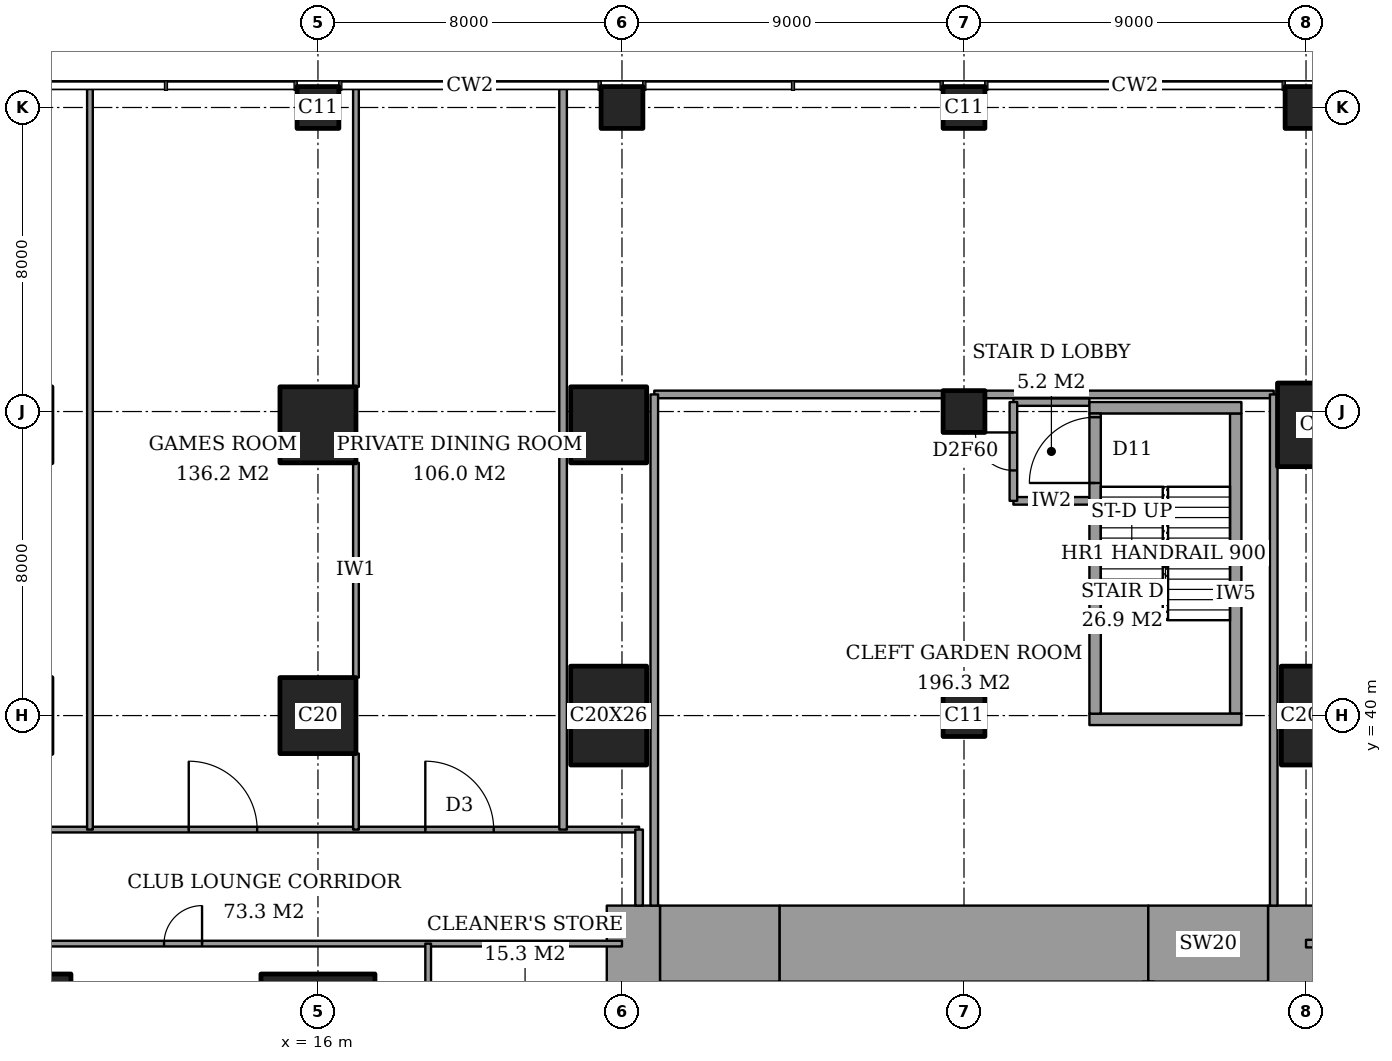
"""IFC4 building model, lengths in metres.
Left out: names, types, materials, properties, quantities, classifications, styles, units other than length and angle.
Written with IfcOpenShell. Run it as: python <this file> out.ifc"""

import sys

from ifc_helpers import new_model, si_unit, direction, frame, frame_2d, origin, origin_2d, place, context, subcontext, project, spatial, rectangle, extrude, element, fill, save


model = new_model("IFC4")
c1 = context("Model", 3, precision=1e-05, world=origin(), true_north=direction((0.0, 1.0)))
c2 = subcontext(c1, "Body", "Model", "MODEL_VIEW")
j1 = project(units=[si_unit("LENGTHUNIT", "METRE"), si_unit("PLANEANGLEUNIT", "RADIAN")], contexts=[c1])
p1 = place(None, origin())
s1 = spatial("IfcSite", under=j1, at=p1, CompositionType="ELEMENT")
p2 = place(p1, origin())
s2 = spatial("IfcBuilding", under=s1, at=p2, CompositionType="ELEMENT")
p3 = place(p2, frame((0.0, 0.0, 6.0)))
s3 = spatial("IfcBuildingStorey", under=s2, at=p3, CompositionType="ELEMENT", Elevation=6.0)
for number, where, z_axis, x_axis in (
    (1, (8.0, 32.0, 0.0), (0.0, 0.0, 1.0), (1.0, 0.0, 0.0)),
    (2, (16.0, 32.0, 0.0), (0.0, 0.0, 1.0), (1.0, 0.0, 0.0)),
):
    element("IfcColumn", number, at=place(p3, frame(where, z_axis=z_axis, x_axis=x_axis)), inside=s3, PredefinedType="COLUMN", context=c2, shape_type="SweptSolid", body=[
        extrude(rectangle(XDim=3.0, YDim=2.4, at=origin_2d()), origin(), (0.0, 0.0, 1.0), 5.0),
    ])
for number, where, z_axis, x_axis in (
    (3, (16.0, 40.0, 0.0), (0.0, 0.0, 1.0), (1.0, 0.0, 0.0)),
    (4, (16.0, 47.65, 0.0), (0.0, 0.0, 1.0), (1.0, 0.0, 0.0)),
):
    element("IfcColumn", number, at=place(p3, frame(where, z_axis=z_axis, x_axis=x_axis)), inside=s3, PredefinedType="COLUMN", context=c2, shape_type="SweptSolid", body=[
        extrude(rectangle(XDim=2.0, YDim=2.0, at=origin_2d()), origin(), (0.0, 0.0, 1.0), 5.0),
    ])
p4 = place(p3, frame((16.0, 56.0, 0.0), z_axis=(0.0, 0.0, 1.0), x_axis=(1.0, 0.0, 0.0)))
e5 = element("IfcColumn", 5, at=p4, inside=s3, PredefinedType="COLUMN", context=c2, shape_type="SweptSolid", body=[
    extrude(rectangle(XDim=1.1, YDim=1.1, at=origin_2d()), origin(), (0.0, 0.0, 1.0), 5.0),
])
p5 = place(p3, frame((23.65, 40.0, 0.0), z_axis=(0.0, 0.0, 1.0), x_axis=(1.0, 0.0, 0.0)))
e6 = element("IfcColumn", 6, at=p5, inside=s3, PredefinedType="COLUMN", context=c2, shape_type="SweptSolid", body=[
    extrude(rectangle(XDim=2.0, YDim=2.6, at=origin_2d()), origin(), (0.0, 0.0, 1.0), 5.0),
])
p6 = place(p3, frame((23.65, 47.65, 0.0), z_axis=(0.0, 0.0, 1.0), x_axis=(1.0, 0.0, 0.0)))
e7 = element("IfcColumn", 7, at=p6, inside=s3, PredefinedType="COLUMN", context=c2, shape_type="SweptSolid", body=[
    extrude(rectangle(XDim=2.0, YDim=2.0, at=origin_2d()), origin(), (0.0, 0.0, 1.0), 5.0),
])
for number, where, z_axis, x_axis in (
    (8, (24.0, 56.0, 0.0), (0.0, 0.0, 1.0), (1.0, 0.0, 0.0)),
    (9, (33.0, 40.0, 0.0), (0.0, 0.0, 1.0), (1.0, 0.0, 0.0)),
    (10, (33.0, 48.0, 0.0), (0.0, 0.0, 1.0), (1.0, 0.0, 0.0)),
    (11, (33.0, 56.0, 0.0), (0.0, 0.0, 1.0), (1.0, 0.0, 0.0)),
):
    element("IfcColumn", number, at=place(p3, frame(where, z_axis=z_axis, x_axis=x_axis)), inside=s3, PredefinedType="COLUMN", context=c2, shape_type="SweptSolid", body=[
        extrude(rectangle(XDim=1.1, YDim=1.1, at=origin_2d()), origin(), (0.0, 0.0, 1.0), 5.0),
    ])
p7 = place(p3, frame((42.35, 40.0, 0.0), z_axis=(0.0, 0.0, 1.0), x_axis=(1.0, 0.0, 0.0)))
e12 = element("IfcColumn", 12, at=p7, inside=s3, PredefinedType="COLUMN", context=c2, shape_type="SweptSolid", body=[
    extrude(rectangle(XDim=2.0, YDim=2.6, at=origin_2d()), origin(), (0.0, 0.0, 1.0), 5.0),
])
p8 = place(p3, frame((42.35, 47.65, 0.0), z_axis=(0.0, 0.0, 1.0), x_axis=(1.0, 0.0, 0.0)))
e13 = element("IfcColumn", 13, at=p8, inside=s3, PredefinedType="COLUMN", context=c2, shape_type="SweptSolid", body=[
    extrude(rectangle(XDim=2.2, YDim=2.2, at=origin_2d()), origin(), (0.0, 0.0, 1.0), 5.0),
])
p9 = place(p3, frame((42.0, 56.0, 0.0), z_axis=(0.0, 0.0, 1.0), x_axis=(1.0, 0.0, 0.0)))
e14 = element("IfcColumn", 14, at=p9, inside=s3, PredefinedType="COLUMN", context=c2, shape_type="SweptSolid", body=[
    extrude(rectangle(XDim=1.1, YDim=1.1, at=origin_2d()), origin(), (0.0, 0.0, 1.0), 5.0),
])
p10 = place(p3, frame((25.0, 34.0, 0.0), z_axis=(0.0, 0.0, 1.0), x_axis=(1.0, 0.0, 0.0)))
e15 = element("IfcWall", 15, at=p10, inside=s3, PredefinedType="SHEAR", context=c2, shape_type="SweptSolid", body=[
    extrude(rectangle(XDim=3.15, YDim=2.0, at=frame_2d((1.575, 0.0))), origin(), (0.0, 0.0, 1.0), 5.0),
])
p11 = place(p3, frame((28.15, 34.0, 0.0), z_axis=(0.0, 0.0, 1.0), x_axis=(1.0, 0.0, 0.0)))
e16 = element("IfcWall", 16, at=p11, inside=s3, PredefinedType="SHEAR", context=c2, shape_type="SweptSolid", body=[
    extrude(rectangle(XDim=9.7, YDim=2.0, at=frame_2d((4.85, 0.0))), origin(), (0.0, 0.0, 1.0), 5.0),
])
p12 = place(p3, frame((37.85, 34.0, 0.0), z_axis=(0.0, 0.0, 1.0), x_axis=(1.0, 0.0, 0.0)))
e17 = element("IfcWall", 17, at=p12, inside=s3, PredefinedType="SHEAR", context=c2, shape_type="SweptSolid", body=[
    extrude(rectangle(XDim=3.15, YDim=2.0, at=frame_2d((1.575, 0.0))), origin(), (0.0, 0.0, 1.0), 5.0),
])
p13 = place(p3, frame((24.3, 23.15, 0.0), z_axis=(0.0, 0.0, 1.0), x_axis=(0.0, 1.0, 0.0)))
e18 = element("IfcWall", 18, at=p13, inside=s3, PredefinedType="SHEAR", context=c2, shape_type="SweptSolid", body=[
    extrude(rectangle(XDim=11.85, YDim=1.4, at=frame_2d((5.925, 0.0))), origin(), (0.0, 0.0, 1.0), 5.0),
])
p14 = place(p13, frame((0.75, 0.0, 0.0)))
e19 = element("IfcOpeningElement", 19, at=p14, cuts=e18, PredefinedType="OPENING", context=c2, shape_type="SweptSolid", body=[
    extrude(rectangle(XDim=1.8, YDim=2.4, at=frame_2d((0.9, 1.2))), frame((0.0, 0.71, 0.0), z_axis=(0.0, -1.0, 0.0), x_axis=(1.0, 0.0, 0.0)), (0.0, 0.0, 1.0), 1.42),
])
p15 = place(p3, frame((41.7, 24.85, 0.0), z_axis=(0.0, 0.0, 1.0), x_axis=(0.0, 1.0, 0.0)))
e20 = element("IfcWall", 20, at=p15, inside=s3, PredefinedType="SHEAR", context=c2, shape_type="SweptSolid", body=[
    extrude(rectangle(XDim=10.15, YDim=1.4, at=frame_2d((5.075, 0.0))), origin(), (0.0, 0.0, 1.0), 5.0),
])
p16 = place(p3, frame((42.0, 34.0, 0.0), z_axis=(0.0, 0.0, 1.0), x_axis=(1.0, 0.0, 0.0)))
e21 = element("IfcWall", 21, at=p16, inside=s3, PredefinedType="PARTITIONING", context=c2, shape_type="SweptSolid", body=[
    extrude(rectangle(XDim=6.0, YDim=0.2, at=frame_2d((3.0, 0.0))), origin(), (0.0, 0.0, 1.0), 4.7),
])
p17 = place(p3, frame((0.0, 34.0, 0.0), z_axis=(0.0, 0.0, 1.0), x_axis=(1.0, 0.0, 0.0)))
e22 = element("IfcWall", 22, at=p17, inside=s3, PredefinedType="PARTITIONING", context=c2, shape_type="SweptSolid", body=[
    extrude(rectangle(XDim=24.0, YDim=0.15, at=frame_2d((12.0, 0.0))), origin(), (0.0, 0.0, 1.0), 4.7),
])
p18 = place(p17, frame((11.95, 0.0, 0.0)))
e23 = element("IfcOpeningElement", 23, at=p18, cuts=e22, PredefinedType="OPENING", context=c2, shape_type="SweptSolid", body=[
    extrude(rectangle(XDim=1.0, YDim=2.1, at=frame_2d((0.5, 1.05))), frame((0.0, 0.085, 0.0), z_axis=(0.0, -1.0, 0.0), x_axis=(1.0, 0.0, 0.0)), (0.0, 0.0, 1.0), 0.17),
])
p19 = place(p17, frame((2.55, 0.0, 0.0)))
e24 = element("IfcOpeningElement", 24, at=p19, cuts=e22, PredefinedType="OPENING", context=c2, shape_type="SweptSolid", body=[
    extrude(rectangle(XDim=0.9, YDim=2.1, at=frame_2d((0.45, 1.05))), frame((0.0, 0.085, 0.0), z_axis=(0.0, -1.0, 0.0), x_axis=(1.0, 0.0, 0.0)), (0.0, 0.0, 1.0), 0.17),
])
p20 = place(p3, frame((0.0, 37.0, 0.0), z_axis=(0.0, 0.0, 1.0), x_axis=(1.0, 0.0, 0.0)))
e25 = element("IfcWall", 25, at=p20, inside=s3, PredefinedType="PARTITIONING", context=c2, shape_type="SweptSolid", body=[
    extrude(rectangle(XDim=24.45, YDim=0.15, at=frame_2d((12.225, 0.0))), origin(), (0.0, 0.0, 1.0), 4.7),
])
p21 = place(p20, frame((4.1, 0.0, 0.0)))
e26 = element("IfcOpeningElement", 26, at=p21, cuts=e25, PredefinedType="OPENING", context=c2, shape_type="SweptSolid", body=[
    extrude(rectangle(XDim=1.8, YDim=2.1, at=frame_2d((0.9, 1.05))), frame((0.0, 0.085, 0.0), z_axis=(0.0, -1.0, 0.0), x_axis=(1.0, 0.0, 0.0)), (0.0, 0.0, 1.0), 0.17),
])
p22 = place(p20, frame((12.6, 0.0, 0.0)))
e27 = element("IfcOpeningElement", 27, at=p22, cuts=e25, PredefinedType="OPENING", context=c2, shape_type="SweptSolid", body=[
    extrude(rectangle(XDim=1.8, YDim=2.1, at=frame_2d((0.9, 1.05))), frame((0.0, 0.085, 0.0), z_axis=(0.0, -1.0, 0.0), x_axis=(1.0, 0.0, 0.0)), (0.0, 0.0, 1.0), 0.17),
])
p23 = place(p20, frame((18.825, 0.0, 0.0)))
e28 = element("IfcOpeningElement", 28, at=p23, cuts=e25, PredefinedType="OPENING", context=c2, shape_type="SweptSolid", body=[
    extrude(rectangle(XDim=1.8, YDim=2.1, at=frame_2d((0.9, 1.05))), frame((0.0, 0.085, 0.0), z_axis=(0.0, -1.0, 0.0), x_axis=(1.0, 0.0, 0.0)), (0.0, 0.0, 1.0), 0.17),
])
for number, where, z_axis, x_axis in (
    (29, (34.3, 45.65, 0.0), (0.0, 0.0, 1.0), (1.0, 0.0, 0.0)),
    (30, (34.3, 48.25, 0.0), (0.0, 0.0, 1.0), (1.0, 0.0, 0.0)),
):
    element("IfcWall", number, at=place(p3, frame(where, z_axis=z_axis, x_axis=x_axis)), inside=s3, PredefinedType="PARTITIONING", context=c2, shape_type="SweptSolid", body=[
        extrude(rectangle(XDim=2.0, YDim=0.2, at=frame_2d((1.0, 0.0))), origin(), (0.0, 0.0, 1.0), 4.7),
    ])
for number, where, z_axis, x_axis in (
    (31, (24.85, 48.45, 0.0), (0.0, 0.0, 1.0), (1.0, 0.0, 0.0)),
    (32, (33.55, 48.45, 0.0), (0.0, 0.0, 1.0), (1.0, 0.0, 0.0)),
):
    element("IfcWall", number, at=place(p3, frame(where, z_axis=z_axis, x_axis=x_axis)), inside=s3, PredefinedType="PARTITIONING", context=c2, shape_type="SweptSolid", body=[
        extrude(rectangle(XDim=7.6, YDim=0.2, at=frame_2d((3.8, 0.0))), origin(), (0.0, 0.0, 1.0), 4.7),
    ])
p24 = place(p3, frame((10.0, 37.0, 0.0), z_axis=(0.0, 0.0, 1.0), x_axis=(0.0, 1.0, 0.0)))
e33 = element("IfcWall", 33, at=p24, inside=s3, PredefinedType="PARTITIONING", context=c2, shape_type="SweptSolid", body=[
    extrude(rectangle(XDim=19.561, YDim=0.15, at=frame_2d((9.781, 0.0))), origin(), (0.0, 0.0, 1.0), 4.7),
])
p25 = place(p3, frame((17.0, 37.0, 0.0), z_axis=(0.0, 0.0, 1.0), x_axis=(0.0, 1.0, 0.0)))
e34 = element("IfcWall", 34, at=p25, inside=s3, PredefinedType="PARTITIONING", context=c2, shape_type="SweptSolid", body=[
    extrude(rectangle(XDim=2.0, YDim=0.15, at=frame_2d((1.0, 0.0))), origin(), (0.0, 0.0, 1.0), 4.7),
])
p26 = place(p3, frame((17.0, 41.0, 0.0), z_axis=(0.0, 0.0, 1.0), x_axis=(0.0, 1.0, 0.0)))
e35 = element("IfcWall", 35, at=p26, inside=s3, PredefinedType="PARTITIONING", context=c2, shape_type="SweptSolid", body=[
    extrude(rectangle(XDim=5.65, YDim=0.15, at=frame_2d((2.825, 0.0))), origin(), (0.0, 0.0, 1.0), 4.7),
])
p27 = place(p3, frame((17.0, 48.65, 0.0), z_axis=(0.0, 0.0, 1.0), x_axis=(0.0, 1.0, 0.0)))
e36 = element("IfcWall", 36, at=p27, inside=s3, PredefinedType="PARTITIONING", context=c2, shape_type="SweptSolid", body=[
    extrude(rectangle(XDim=7.911, YDim=0.15, at=frame_2d((3.956, 0.0))), origin(), (0.0, 0.0, 1.0), 4.7),
])
p28 = place(p3, frame((18.9, 31.0, 0.0), z_axis=(0.0, 0.0, 1.0), x_axis=(0.0, 1.0, 0.0)))
e37 = element("IfcWall", 37, at=p28, inside=s3, PredefinedType="PARTITIONING", context=c2, shape_type="SweptSolid", body=[
    extrude(rectangle(XDim=3.0, YDim=0.15, at=frame_2d((1.5, 0.0))), origin(), (0.0, 0.0, 1.0), 4.7),
])
p29 = place(p28, frame((1.05, 0.0, 0.0)))
e38 = element("IfcOpeningElement", 38, at=p29, cuts=e37, PredefinedType="OPENING", context=c2, shape_type="SweptSolid", body=[
    extrude(rectangle(XDim=0.9, YDim=2.1, at=frame_2d((0.45, 1.05))), frame((0.0, 0.085, 0.0), z_axis=(0.0, -1.0, 0.0), x_axis=(1.0, 0.0, 0.0)), (0.0, 0.0, 1.0), 0.17),
])
p30 = place(p3, frame((22.45, 37.0, 0.0), z_axis=(0.0, 0.0, 1.0), x_axis=(0.0, 1.0, 0.0)))
e39 = element("IfcWall", 39, at=p30, inside=s3, PredefinedType="PARTITIONING", context=c2, shape_type="SweptSolid", body=[
    extrude(rectangle(XDim=19.561, YDim=0.2, at=frame_2d((9.781, 0.0))), origin(), (0.0, 0.0, 1.0), 4.7),
])
p31 = place(p3, frame((24.45, 35.0, 0.0), z_axis=(0.0, 0.0, 1.0), x_axis=(0.0, 1.0, 0.0)))
e40 = element("IfcWall", 40, at=p31, inside=s3, PredefinedType="PARTITIONING", context=c2, shape_type="SweptSolid", body=[
    extrude(rectangle(XDim=2.0, YDim=0.2, at=frame_2d((1.0, 0.0))), origin(), (0.0, 0.0, 1.0), 4.7),
])
p32 = place(p3, frame((24.85, 35.0, 0.0), z_axis=(0.0, 0.0, 1.0), x_axis=(0.0, 1.0, 0.0)))
e41 = element("IfcWall", 41, at=p32, inside=s3, PredefinedType="PARTITIONING", context=c2, shape_type="SweptSolid", body=[
    extrude(rectangle(XDim=13.45, YDim=0.2, at=frame_2d((6.725, 0.0))), origin(), (0.0, 0.0, 1.0), 4.7),
])
p33 = place(p3, frame((34.3, 45.65, 0.0), z_axis=(0.0, 0.0, 1.0), x_axis=(0.0, 1.0, 0.0)))
e42 = element("IfcWall", 42, at=p33, inside=s3, PredefinedType="PARTITIONING", context=c2, shape_type="SweptSolid", body=[
    extrude(rectangle(XDim=2.6, YDim=0.2, at=frame_2d((1.3, 0.0))), origin(), (0.0, 0.0, 1.0), 4.7),
])
p34 = place(p33, frame((0.8, 0.0, 0.0)))
e43 = element("IfcOpeningElement", 43, at=p34, cuts=e42, PredefinedType="OPENING", context=c2, shape_type="SweptSolid", body=[
    extrude(rectangle(XDim=1.0, YDim=2.1, at=frame_2d((0.5, 1.05))), frame((0.0, 0.11, 0.0), z_axis=(0.0, -1.0, 0.0), x_axis=(1.0, 0.0, 0.0)), (0.0, 0.0, 1.0), 0.22),
])
p35 = place(p3, frame((41.15, 35.0, 0.0), z_axis=(0.0, 0.0, 1.0), x_axis=(0.0, 1.0, 0.0)))
e44 = element("IfcWall", 44, at=p35, inside=s3, PredefinedType="PARTITIONING", context=c2, shape_type="SweptSolid", body=[
    extrude(rectangle(XDim=13.45, YDim=0.2, at=frame_2d((6.725, 0.0))), origin(), (0.0, 0.0, 1.0), 4.7),
])
for number, where, z_axis, x_axis in (
    (45, (36.3, 39.9, 0.0), (0.0, 0.0, 1.0), (1.0, 0.0, 0.0)),
    (46, (36.3, 48.1, 0.0), (0.0, 0.0, 1.0), (1.0, 0.0, 0.0)),
):
    element("IfcWall", number, at=place(p3, frame(where, z_axis=z_axis, x_axis=x_axis)), inside=s3, PredefinedType="PARTITIONING", context=c2, shape_type="SweptSolid", body=[
        extrude(rectangle(XDim=4.0, YDim=0.3, at=frame_2d((2.0, 0.0))), origin(), (0.0, 0.0, 1.0), 5.0),
    ])
p36 = place(p3, frame((36.45, 40.05, 0.0), z_axis=(0.0, 0.0, 1.0), x_axis=(0.0, 1.0, 0.0)))
e47 = element("IfcWall", 47, at=p36, inside=s3, PredefinedType="PARTITIONING", context=c2, shape_type="SweptSolid", body=[
    extrude(rectangle(XDim=7.9, YDim=0.3, at=frame_2d((3.95, 0.0))), origin(), (0.0, 0.0, 1.0), 5.0),
])
p37 = place(p36, frame((6.07, 0.0, 0.0)))
e48 = element("IfcOpeningElement", 48, at=p37, cuts=e47, PredefinedType="OPENING", context=c2, shape_type="SweptSolid", body=[
    extrude(rectangle(XDim=1.73, YDim=2.1, at=frame_2d((0.865, 1.05))), frame((0.0, 0.16, 0.0), z_axis=(0.0, -1.0, 0.0), x_axis=(1.0, 0.0, 0.0)), (0.0, 0.0, 1.0), 0.32),
])
p38 = place(p3, frame((40.15, 40.05, 0.0), z_axis=(0.0, 0.0, 1.0), x_axis=(0.0, 1.0, 0.0)))
e49 = element("IfcWall", 49, at=p38, inside=s3, PredefinedType="PARTITIONING", context=c2, shape_type="SweptSolid", body=[
    extrude(rectangle(XDim=7.9, YDim=0.3, at=frame_2d((3.95, 0.0))), origin(), (0.0, 0.0, 1.0), 5.0),
])
p39 = place(p18, origin())
e50 = element("IfcDoor", 50, at=p39, inside=s3, OperationType="SINGLE_SWING_LEFT", PredefinedType="DOOR", context=c2, shape_type="SweptSolid", body=[
    extrude(rectangle(XDim=1.0, YDim=2.1, at=frame_2d((0.5, 1.05))), frame((0.0, 0.025, 0.0), z_axis=(0.0, -1.0, 0.0), x_axis=(1.0, 0.0, 0.0)), (0.0, 0.0, 1.0), 0.05),
])
fill(e23, e50)
p40 = place(p22, origin())
e51 = element("IfcDoor", 51, at=p40, inside=s3, OperationType="DOUBLE_DOOR_DOUBLE_SWING", PredefinedType="DOOR", context=c2, shape_type="SweptSolid", body=[
    extrude(rectangle(XDim=1.8, YDim=2.1, at=frame_2d((0.9, 1.05))), frame((0.0, 0.025, 0.0), z_axis=(0.0, -1.0, 0.0), x_axis=(1.0, 0.0, 0.0)), (0.0, 0.0, 1.0), 0.05),
])
fill(e27, e51)
p41 = place(p23, origin())
e52 = element("IfcDoor", 52, at=p41, inside=s3, OperationType="DOUBLE_DOOR_DOUBLE_SWING", PredefinedType="DOOR", context=c2, shape_type="SweptSolid", body=[
    extrude(rectangle(XDim=1.8, YDim=2.1, at=frame_2d((0.9, 1.05))), frame((0.0, 0.025, 0.0), z_axis=(0.0, -1.0, 0.0), x_axis=(1.0, 0.0, 0.0)), (0.0, 0.0, 1.0), 0.05),
])
fill(e28, e52)
p42 = place(p34, origin())
e53 = element("IfcDoor", 53, at=p42, inside=s3, OperationType="SINGLE_SWING_LEFT", PredefinedType="DOOR", context=c2, shape_type="SweptSolid", body=[
    extrude(rectangle(XDim=1.0, YDim=2.1, at=frame_2d((0.5, 1.05))), frame((0.0, 0.025, 0.0), z_axis=(0.0, -1.0, 0.0), x_axis=(1.0, 0.0, 0.0)), (0.0, 0.0, 1.0), 0.05),
])
fill(e43, e53)
p43 = place(p37, origin())
e54 = element("IfcDoor", 54, at=p43, inside=s3, OperationType="DOUBLE_DOOR_SINGLE_SWING", PredefinedType="DOOR", context=c2, shape_type="SweptSolid", body=[
    extrude(rectangle(XDim=1.73, YDim=2.1, at=frame_2d((0.865, 1.05))), frame((0.0, 0.025, 0.0), z_axis=(0.0, -1.0, 0.0), x_axis=(1.0, 0.0, 0.0)), (0.0, 0.0, 1.0), 0.05),
])
fill(e48, e54)
save(model, sys.argv[1])
